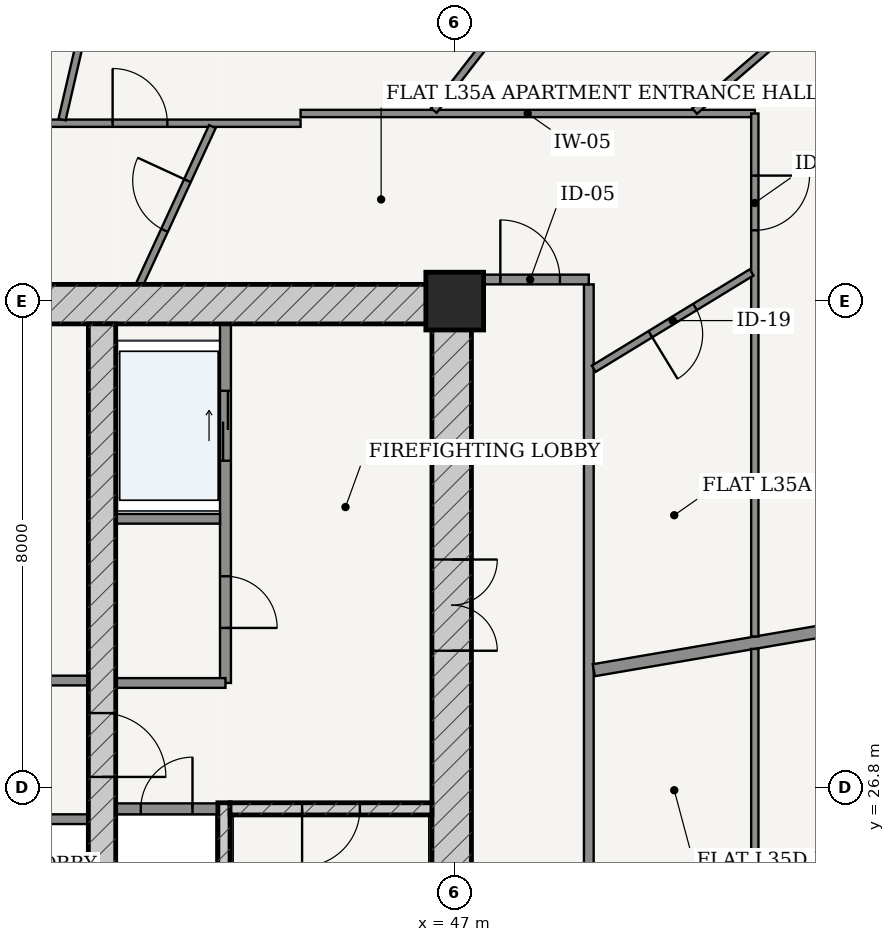
"""IFC4 building model, lengths in metres.
Left out: names, types, materials, properties, quantities, classifications, styles, units other than length and angle.
Written with IfcOpenShell. Run it as: python <this file> out.ifc"""

import sys

from ifc_helpers import new_model, si_unit, direction, frame, frame_2d, origin, origin_2d, place, context, subcontext, project, spatial, rectangle, extrude, source, transform, mapped, element, fill, save


model = new_model("IFC4")
c1 = context("Model", 3, precision=1e-05, world=origin(), true_north=direction((-0.2419218956, 0.970295726276)))
c2 = subcontext(c1, "Body", "Model", "MODEL_VIEW")
j1 = project(units=[si_unit("LENGTHUNIT", "METRE"), si_unit("PLANEANGLEUNIT", "RADIAN")], contexts=[c1])
p1 = place(None, origin())
s1 = spatial("IfcSite", under=j1, at=p1, CompositionType="ELEMENT")
p2 = place(p1, origin())
s2 = spatial("IfcBuilding", under=s1, at=p2, CompositionType="ELEMENT")
p3 = place(p2, frame((0.0, 0.0, 135.4)))
s3 = spatial("IfcBuildingStorey", under=s2, at=p3, CompositionType="ELEMENT", Elevation=135.4)
p4 = place(p3, frame((47.0, 34.8, 0.0), z_axis=(0.0, 0.0, 1.0), x_axis=(1.0, 0.0, 0.0)))
e1 = element("IfcColumn", 1, at=p4, inside=s3, PredefinedType="COLUMN", context=c2, shape_type="SweptSolid", body=[
    extrude(rectangle(XDim=0.95, YDim=0.95, at=origin_2d()), origin(), (0.0, 0.0, 1.0), 3.6),
])
p5 = place(p3, frame((28.725, 34.75, 0.0), z_axis=(0.0, 0.0, 1.0), x_axis=(1.0, 0.0, 0.0)))
e2 = element("IfcWall", 2, at=p5, inside=s3, PredefinedType="SHEAR", context=c2, shape_type="SweptSolid", body=[
    extrude(rectangle(XDim=18.55, YDim=0.65, at=frame_2d((9.275, 0.0))), origin(), (0.0, 0.0, 1.0), 3.33),
])
p6 = place(p3, frame((46.95, 19.175, 0.0), z_axis=(0.0, 0.0, 1.0), x_axis=(0.0, 1.0, 0.0)))
e3 = element("IfcWall", 3, at=p6, inside=s3, PredefinedType="SHEAR", context=c2, shape_type="SweptSolid", body=[
    extrude(rectangle(XDim=15.25, YDim=0.65, at=frame_2d((7.625, 0.0))), origin(), (0.0, 0.0, 1.0), 3.33),
])
p7 = place(p6, frame((9.875, 0.0, 0.0)))
e4 = element("IfcOpeningElement", 4, at=p7, cuts=e3, PredefinedType="OPENING", context=c2, shape_type="SweptSolid", body=[
    extrude(rectangle(XDim=1.5, YDim=2.2, at=frame_2d((0.75, 1.1))), frame((0.0, 0.335, 0.0), z_axis=(0.0, -1.0, 0.0), x_axis=(1.0, 0.0, 0.0)), (0.0, 0.0, 1.0), 0.67),
])
p8 = place(p3, frame((43.205, 19.175, 0.0), z_axis=(0.0, 0.0, 1.0), x_axis=(0.0, 1.0, 0.0)))
e5 = element("IfcWall", 5, at=p8, inside=s3, PredefinedType="SOLIDWALL", context=c2, shape_type="SweptSolid", body=[
    extrude(rectangle(XDim=7.375, YDim=0.2, at=frame_2d((3.688, 0.0))), origin(), (0.0, 0.0, 1.0), 3.33),
])
p9 = place(p3, frame((43.305, 26.45, 0.0), z_axis=(0.0, 0.0, 1.0), x_axis=(1.0, 0.0, 0.0)))
e6 = element("IfcWall", 6, at=p9, inside=s3, PredefinedType="SOLIDWALL", context=c2, shape_type="SweptSolid", body=[
    extrude(rectangle(XDim=3.32, YDim=0.2, at=frame_2d((1.66, 0.0))), origin(), (0.0, 0.0, 1.0), 3.33),
])
p10 = place(p9, frame((1.185, 0.0, 0.0)))
e7 = element("IfcOpeningElement", 7, at=p10, cuts=e6, PredefinedType="OPENING", context=c2, shape_type="SweptSolid", body=[
    extrude(rectangle(XDim=0.95, YDim=2.15, at=frame_2d((0.475, 1.075))), frame((0.0, 0.11, 0.0), z_axis=(0.0, -1.0, 0.0), x_axis=(1.0, 0.0, 0.0)), (0.0, 0.0, 1.0), 0.22),
])
p11 = place(p3, frame((41.2, 19.175, 0.0), z_axis=(0.0, 0.0, 1.0), x_axis=(0.0, 1.0, 0.0)))
e8 = element("IfcWall", 8, at=p11, inside=s3, PredefinedType="SHEAR", context=c2, shape_type="SweptSolid", body=[
    extrude(rectangle(XDim=15.25, YDim=0.45, at=frame_2d((7.625, 0.0))), origin(), (0.0, 0.0, 1.0), 3.33),
])
p12 = place(p11, frame((7.8, 0.0, 0.0)))
e9 = element("IfcOpeningElement", 9, at=p12, cuts=e8, PredefinedType="OPENING", context=c2, shape_type="SweptSolid", body=[
    extrude(rectangle(XDim=1.05, YDim=2.15, at=frame_2d((0.525, 1.075))), frame((0.0, 0.235, 0.0), z_axis=(0.0, -1.0, 0.0), x_axis=(1.0, 0.0, 0.0)), (0.0, 0.0, 1.0), 0.47),
])
p13 = place(p3, frame((41.425, 26.45, 0.0), z_axis=(0.0, 0.0, 1.0), x_axis=(1.0, 0.0, 0.0)))
e10 = element("IfcWall", 10, at=p13, inside=s3, PredefinedType="PARTITIONING", context=c2, shape_type="SweptSolid", body=[
    extrude(rectangle(XDim=1.675, YDim=0.18, at=frame_2d((0.837, 0.0))), origin(), (0.0, 0.0, 1.0), 3.33),
])
p14 = place(p13, frame((0.413, 0.0, 0.0)))
e11 = element("IfcOpeningElement", 11, at=p14, cuts=e10, PredefinedType="OPENING", context=c2, shape_type="SweptSolid", body=[
    extrude(rectangle(XDim=0.85, YDim=2.1, at=frame_2d((0.425, 1.05))), frame((0.0, 0.1, 0.0), z_axis=(0.0, -1.0, 0.0), x_axis=(1.0, 0.0, 0.0)), (0.0, 0.0, 1.0), 0.2),
])
p15 = place(p3, frame((43.23, 28.52, 0.0), z_axis=(0.0, 0.0, 1.0), x_axis=(0.0, 1.0, 0.0)))
e12 = element("IfcWall", 12, at=p15, inside=s3, PredefinedType="PARTITIONING", context=c2, shape_type="SweptSolid", body=[
    extrude(rectangle(XDim=5.905, YDim=0.18, at=frame_2d((2.953, 0.0))), origin(), (0.0, 0.0, 1.0), 3.33),
])
p16 = place(p15, frame((0.905, 0.0, 0.0)))
e13 = element("IfcOpeningElement", 13, at=p16, cuts=e12, PredefinedType="OPENING", context=c2, shape_type="SweptSolid", body=[
    extrude(rectangle(XDim=0.85, YDim=2.1, at=frame_2d((0.425, 1.05))), frame((0.0, 0.1, 0.0), z_axis=(0.0, -1.0, 0.0), x_axis=(1.0, 0.0, 0.0)), (0.0, 0.0, 1.0), 0.2),
])
p17 = place(p15, frame((3.655, 0.0, 0.0)))
e14 = element("IfcOpeningElement", 14, at=p17, cuts=e12, PredefinedType="OPENING", context=c2, shape_type="SweptSolid", body=[
    extrude(rectangle(XDim=1.15, YDim=2.2, at=frame_2d((0.575, 1.1))), frame((0.0, 0.1, 0.0), z_axis=(0.0, -1.0, 0.0), x_axis=(1.0, 0.0, 0.0)), (0.0, 0.0, 1.0), 0.2),
])
p18 = place(p3, frame((41.425, 31.22, 0.0), z_axis=(0.0, 0.0, 1.0), x_axis=(1.0, 0.0, 0.0)))
e15 = element("IfcWall", 15, at=p18, inside=s3, PredefinedType="PARTITIONING", context=c2, shape_type="SweptSolid", body=[
    extrude(rectangle(XDim=1.715, YDim=0.16, at=frame_2d((0.857, 0.0))), origin(), (0.0, 0.0, 1.0), 3.33),
])
p19 = place(p3, frame((41.425, 28.52, 0.0), z_axis=(0.0, 0.0, 1.0), x_axis=(1.0, 0.0, 0.0)))
e16 = element("IfcWall", 16, at=p19, inside=s3, PredefinedType="PARTITIONING", context=c2, shape_type="SweptSolid", body=[
    extrude(rectangle(XDim=1.805, YDim=0.16, at=frame_2d((0.902, 0.0))), origin(), (0.0, 0.0, 1.0), 3.33),
])
p20 = place(p3, frame((35.025, 28.56, 0.0), z_axis=(0.0, 0.0, 1.0), x_axis=(1.0, 0.0, 0.0)))
e17 = element("IfcWall", 17, at=p20, inside=s3, PredefinedType="PARTITIONING", context=c2, shape_type="SweptSolid", body=[
    extrude(rectangle(XDim=5.95, YDim=0.16, at=frame_2d((2.975, 0.0))), origin(), (0.0, 0.0, 1.0), 3.33),
])
p21 = place(p20, frame((1.008, 0.0, 0.0)))
e18 = element("IfcOpeningElement", 18, at=p21, cuts=e17, PredefinedType="OPENING", context=c2, shape_type="SweptSolid", body=[
    extrude(rectangle(XDim=0.86, YDim=2.1, at=frame_2d((0.43, 1.05))), frame((0.0, 0.09, 0.0), z_axis=(0.0, -1.0, 0.0), x_axis=(1.0, 0.0, 0.0)), (0.0, 0.0, 1.0), 0.18),
])
p22 = place(p20, frame((4.087, 0.0, 0.0)))
e19 = element("IfcOpeningElement", 19, at=p22, cuts=e17, PredefinedType="OPENING", context=c2, shape_type="SweptSolid", body=[
    extrude(rectangle(XDim=0.85, YDim=2.1, at=frame_2d((0.425, 1.05))), frame((0.0, 0.09, 0.0), z_axis=(0.0, -1.0, 0.0), x_axis=(1.0, 0.0, 0.0)), (0.0, 0.0, 1.0), 0.18),
])
p23 = place(p3, frame((35.025, 26.28, 0.0), z_axis=(0.0, 0.0, 1.0), x_axis=(1.0, 0.0, 0.0)))
e20 = element("IfcWall", 20, at=p23, inside=s3, PredefinedType="PARTITIONING", context=c2, shape_type="SweptSolid", body=[
    extrude(rectangle(XDim=5.95, YDim=0.16, at=frame_2d((2.975, 0.0))), origin(), (0.0, 0.0, 1.0), 3.33),
])
p24 = place(p23, frame((0.19, 0.0, 0.0)))
e21 = element("IfcOpeningElement", 21, at=p24, cuts=e20, PredefinedType="OPENING", context=c2, shape_type="SweptSolid", body=[
    extrude(rectangle(XDim=1.1, YDim=2.2, at=frame_2d((0.55, 1.1))), frame((0.0, 0.09, 0.0), z_axis=(0.0, -1.0, 0.0), x_axis=(1.0, 0.0, 0.0)), (0.0, 0.0, 1.0), 0.18),
])
p25 = place(p23, frame((1.67, 0.0, 0.0)))
e22 = element("IfcOpeningElement", 22, at=p25, cuts=e20, PredefinedType="OPENING", context=c2, shape_type="SweptSolid", body=[
    extrude(rectangle(XDim=1.1, YDim=2.2, at=frame_2d((0.55, 1.1))), frame((0.0, 0.09, 0.0), z_axis=(0.0, -1.0, 0.0), x_axis=(1.0, 0.0, 0.0)), (0.0, 0.0, 1.0), 0.18),
])
p26 = place(p3, frame((49.205, 16.675, 0.0), z_axis=(0.0, 0.0, 1.0), x_axis=(0.0, 1.0, 0.0)))
e23 = element("IfcWall", 23, at=p26, inside=s3, PredefinedType="PARTITIONING", context=c2, shape_type="SweptSolid", body=[
    extrude(rectangle(XDim=18.4, YDim=0.16, at=frame_2d((9.2, 0.0))), origin(), (0.0, 0.0, 1.0), 2.776),
])
p27 = place(p3, frame((47.275, 35.155, 0.0), z_axis=(0.0, 0.0, 1.0), x_axis=(1.0, 0.0, 0.0)))
e24 = element("IfcWall", 24, at=p27, inside=s3, PredefinedType="PARTITIONING", context=c2, shape_type="SweptSolid", body=[
    extrude(rectangle(XDim=1.93, YDim=0.16, at=frame_2d((0.965, 0.0))), origin(), (0.0, 0.0, 1.0), 2.776),
])
p28 = place(p27, frame((0.475, 0.0, 0.0)))
e25 = element("IfcOpeningElement", 25, at=p28, cuts=e24, PredefinedType="OPENING", context=c2, shape_type="SweptSolid", body=[
    extrude(rectangle(XDim=0.98, YDim=2.2, at=frame_2d((0.49, 1.1))), frame((0.0, 0.09, 0.0), z_axis=(0.0, -1.0, 0.0), x_axis=(1.0, 0.0, 0.0)), (0.0, 0.0, 1.0), 0.18),
])
p29 = place(p3, frame((49.287, 28.73, 0.0), z_axis=(0.0, 0.0, 1.0), x_axis=(0.985698993845, 0.168515558725, 0.0)))
e26 = element("IfcWall", 26, at=p29, inside=s3, PredefinedType="PARTITIONING", context=c2, shape_type="SweptSolid", body=[
    extrude(rectangle(XDim=12.517, YDim=0.2, at=frame_2d((6.259, 0.0))), origin(), (0.0, 0.0, 1.0), 2.776),
])
p30 = place(p3, frame((38.102, 37.725, 0.0), z_axis=(0.0, 0.0, 1.0), x_axis=(1.0, 0.0, 0.0)))
e27 = element("IfcWall", 27, at=p30, inside=s3, PredefinedType="PARTITIONING", context=c2, shape_type="SweptSolid", body=[
    extrude(rectangle(XDim=6.363, YDim=0.12, at=frame_2d((3.182, 0.0))), origin(), (0.0, 0.0, 1.0), 2.776),
])
p31 = place(p30, frame((3.272, 0.0, 0.0)))
e28 = element("IfcOpeningElement", 28, at=p31, cuts=e27, PredefinedType="OPENING", context=c2, shape_type="SweptSolid", body=[
    extrude(rectangle(XDim=0.9, YDim=2.15, at=frame_2d((0.45, 1.075))), frame((0.0, 0.07, 0.0), z_axis=(0.0, -1.0, 0.0), x_axis=(1.0, 0.0, 0.0)), (0.0, 0.0, 1.0), 0.14),
])
p32 = place(p3, frame((44.465, 37.885, 0.0), z_axis=(0.0, 0.0, 1.0), x_axis=(1.0, 0.0, 0.0)))
e29 = element("IfcWall", 29, at=p32, inside=s3, PredefinedType="PARTITIONING", context=c2, shape_type="SweptSolid", body=[
    extrude(rectangle(XDim=7.47, YDim=0.12, at=frame_2d((3.735, 0.0))), origin(), (0.0, 0.0, 1.0), 2.776),
])
p33 = place(p3, frame((51.935, 37.885, 0.0), z_axis=(0.0, 0.0, 1.0), x_axis=(0.0, -1.0, 0.0)))
e30 = element("IfcWall", 30, at=p33, inside=s3, PredefinedType="PARTITIONING", context=c2, shape_type="SweptSolid", body=[
    extrude(rectangle(XDim=8.601, YDim=0.12, at=frame_2d((4.3, 0.0))), origin(), (0.0, 0.0, 1.0), 2.776),
])
p34 = place(p33, frame((1.021, 0.0, 0.0)))
e31 = element("IfcOpeningElement", 31, at=p34, cuts=e30, PredefinedType="OPENING", context=c2, shape_type="SweptSolid", body=[
    extrude(rectangle(XDim=0.9, YDim=2.15, at=frame_2d((0.45, 1.075))), frame((0.0, 0.07, 0.0), z_axis=(0.0, -1.0, 0.0), x_axis=(1.0, 0.0, 0.0)), (0.0, 0.0, 1.0), 0.14),
])
p35 = place(p3, frame((50.944, 37.925, 0.0), z_axis=(0.0, 0.0, 1.0), x_axis=(0.758354915574, 0.65184186888, 0.0)))
e32 = element("IfcWall", 32, at=p35, inside=s3, PredefinedType="PARTITIONING", context=c2, shape_type="SweptSolid", body=[
    extrude(rectangle(XDim=5.432, YDim=0.12, at=frame_2d((2.716, 0.0))), origin(), (0.0, 0.0, 1.0), 2.846),
])
p36 = place(p3, frame((46.656, 37.934, 0.0), z_axis=(0.0, 0.0, 1.0), x_axis=(0.613758289074, 0.789493991487, 0.0)))
e33 = element("IfcWall", 33, at=p36, inside=s3, PredefinedType="PARTITIONING", context=c2, shape_type="SweptSolid", body=[
    extrude(rectangle(XDim=7.695, YDim=0.12, at=frame_2d((3.848, 0.0))), origin(), (0.0, 0.0, 1.0), 2.776),
])
p37 = place(p36, frame((2.395, 0.0, 0.0)))
e34 = element("IfcOpeningElement", 34, at=p37, cuts=e33, PredefinedType="OPENING", context=c2, shape_type="SweptSolid", body=[
    extrude(rectangle(XDim=0.9, YDim=2.15, at=frame_2d((0.45, 1.075))), frame((0.0, 0.07, 0.0), z_axis=(0.0, -1.0, 0.0), x_axis=(1.0, 0.0, 0.0)), (0.0, 0.0, 1.0), 0.14),
])
p38 = place(p3, frame((40.542, 37.785, 0.0), z_axis=(0.0, 0.0, 1.0), x_axis=(0.225467545633, 0.974250679171, 0.0)))
e35 = element("IfcWall", 35, at=p38, inside=s3, PredefinedType="PARTITIONING", context=c2, shape_type="SweptSolid", body=[
    extrude(rectangle(XDim=9.559, YDim=0.12, at=frame_2d((4.78, 0.0))), origin(), (0.0, 0.0, 1.0), 2.776),
])
p39 = place(p38, frame((3.32, 0.0, 0.0)))
e36 = element("IfcOpeningElement", 36, at=p39, cuts=e35, PredefinedType="OPENING", context=c2, shape_type="SweptSolid", body=[
    extrude(rectangle(XDim=0.9, YDim=2.15, at=frame_2d((0.45, 1.075))), frame((0.0, 0.07, 0.0), z_axis=(0.0, -1.0, 0.0), x_axis=(1.0, 0.0, 0.0)), (0.0, 0.0, 1.0), 0.14),
])
p40 = place(p3, frame((49.287, 33.688, 0.0), z_axis=(0.0, 0.0, 1.0), x_axis=(0.853628993111, 0.520881504874, 0.0)))
e37 = element("IfcWall", 37, at=p40, inside=s3, PredefinedType="PARTITIONING", context=c2, shape_type="SweptSolid", body=[
    extrude(rectangle(XDim=3.041, YDim=0.12, at=frame_2d((1.52, 0.0))), origin(), (0.0, 0.0, 1.0), 3.005),
])
p41 = place(p40, frame((1.09, 0.0, 0.0)))
e38 = element("IfcOpeningElement", 38, at=p41, cuts=e37, PredefinedType="OPENING", context=c2, shape_type="SweptSolid", body=[
    extrude(rectangle(XDim=0.86, YDim=2.15, at=frame_2d((0.43, 1.075))), frame((0.0, 0.07, 0.0), z_axis=(0.0, -1.0, 0.0), x_axis=(1.0, 0.0, 0.0)), (0.0, 0.0, 1.0), 0.14),
])
p42 = place(p3, frame((41.817, 35.075, 0.0), z_axis=(0.0, 0.0, 1.0), x_axis=(0.418890148101, 0.908036917655, 0.0)))
e39 = element("IfcWall", 39, at=p42, inside=s3, PredefinedType="PARTITIONING", context=c2, shape_type="SweptSolid", body=[
    extrude(rectangle(XDim=2.856, YDim=0.12, at=frame_2d((1.428, 0.0))), origin(), (0.0, 0.0, 1.0), 3.33),
])
p43 = place(p42, frame((0.978, 0.0, 0.0)))
e40 = element("IfcOpeningElement", 40, at=p43, cuts=e39, PredefinedType="OPENING", context=c2, shape_type="SweptSolid", body=[
    extrude(rectangle(XDim=0.9, YDim=2.15, at=frame_2d((0.45, 1.075))), frame((0.0, 0.07, 0.0), z_axis=(0.0, -1.0, 0.0), x_axis=(1.0, 0.0, 0.0)), (0.0, 0.0, 1.0), 0.14),
])
p44 = place(p3, frame((51.935, 29.08, 0.0), z_axis=(0.0, 0.0, 1.0), x_axis=(0.0, -1.0, 0.0)))
e41 = element("IfcWall", 41, at=p44, inside=s3, PredefinedType="PARTITIONING", context=c2, shape_type="SweptSolid", body=[
    extrude(rectangle(XDim=15.215, YDim=0.12, at=frame_2d((7.608, 0.0))), origin(), (0.0, 0.0, 1.0), 2.776),
])
p45 = place(p44, frame((11.859, 0.0, 0.0)))
e42 = element("IfcOpeningElement", 42, at=p45, cuts=e41, PredefinedType="OPENING", context=c2, shape_type="SweptSolid", body=[
    extrude(rectangle(XDim=0.9, YDim=2.15, at=frame_2d((0.45, 1.075))), frame((0.0, 0.07, 0.0), z_axis=(0.0, -1.0, 0.0), x_axis=(1.0, 0.0, 0.0)), (0.0, 0.0, 1.0), 0.14),
])
p46 = place(p44, frame((7.49, 0.0, 0.0)))
e43 = element("IfcOpeningElement", 43, at=p46, cuts=e41, PredefinedType="OPENING", context=c2, shape_type="SweptSolid", body=[
    extrude(rectangle(XDim=0.9, YDim=2.15, at=frame_2d((0.45, 1.075))), frame((0.0, 0.07, 0.0), z_axis=(0.0, -1.0, 0.0), x_axis=(1.0, 0.0, 0.0)), (0.0, 0.0, 1.0), 0.14),
])
m1 = source(origin(), c2, "Body", "SweptSolid", [
    extrude(rectangle(XDim=1.5, YDim=2.2, at=frame_2d((0.75, 1.1))), frame((0.0, 0.025, 0.0), z_axis=(0.0, -1.0, 0.0), x_axis=(1.0, 0.0, 0.0)), (0.0, 0.0, 1.0), 0.05),
])
p47 = place(p7, frame((1.5, 0.0, 0.0), z_axis=(0.0, 0.0, 1.0), x_axis=(-1.0, 0.0, 0.0)))
e44 = element("IfcDoor", 44, at=p47, inside=s3, OperationType="DOUBLE_DOOR_SINGLE_SWING", PredefinedType="DOOR", context=c2, shape_type="MappedRepresentation", body=[
    mapped(m1, transform((0.0, 0.0, 0.0), scale=1.0)),
])
fill(e4, e44)
m2 = source(origin(), c2, "Body", "SweptSolid", [
    extrude(rectangle(XDim=1.05, YDim=2.15, at=frame_2d((0.525, 1.075))), frame((0.0, 0.025, 0.0), z_axis=(0.0, -1.0, 0.0), x_axis=(1.0, 0.0, 0.0)), (0.0, 0.0, 1.0), 0.05),
])
p48 = place(p12, frame((1.05, 0.0, 0.0), z_axis=(0.0, 0.0, 1.0), x_axis=(-1.0, 0.0, 0.0)))
e45 = element("IfcDoor", 45, at=p48, inside=s3, OperationType="SINGLE_SWING_RIGHT", PredefinedType="DOOR", context=c2, shape_type="MappedRepresentation", body=[
    mapped(m2, transform((0.0, 0.0, 0.0), scale=1.0)),
])
fill(e9, e45)
m3 = source(origin(), c2, "Body", "SweptSolid", [
    extrude(rectangle(XDim=0.95, YDim=2.15, at=frame_2d((0.475, 1.075))), frame((0.0, 0.025, 0.0), z_axis=(0.0, -1.0, 0.0), x_axis=(1.0, 0.0, 0.0)), (0.0, 0.0, 1.0), 0.05),
])
p49 = place(p10, frame((0.95, 0.0, 0.0), z_axis=(0.0, 0.0, 1.0), x_axis=(-1.0, 0.0, 0.0)))
e46 = element("IfcDoor", 46, at=p49, inside=s3, OperationType="SINGLE_SWING_RIGHT", PredefinedType="DOOR", context=c2, shape_type="MappedRepresentation", body=[
    mapped(m3, transform((0.0, 0.0, 0.0), scale=1.0)),
])
fill(e7, e46)
m4 = source(origin(), c2, "Body", "SweptSolid", [
    extrude(rectangle(XDim=0.85, YDim=2.1, at=frame_2d((0.425, 1.05))), frame((0.0, 0.025, 0.0), z_axis=(0.0, -1.0, 0.0), x_axis=(1.0, 0.0, 0.0)), (0.0, 0.0, 1.0), 0.05),
])
p50 = place(p14, origin())
e47 = element("IfcDoor", 47, at=p50, inside=s3, OperationType="SINGLE_SWING_RIGHT", PredefinedType="DOOR", context=c2, shape_type="MappedRepresentation", body=[
    mapped(m4, transform((0.0, 0.0, 0.0), scale=1.0)),
])
fill(e11, e47)
p51 = place(p16, frame((0.85, 0.0, 0.0), z_axis=(0.0, 0.0, 1.0), x_axis=(-1.0, 0.0, 0.0)))
e48 = element("IfcDoor", 48, at=p51, inside=s3, OperationType="SINGLE_SWING_RIGHT", PredefinedType="DOOR", context=c2, shape_type="MappedRepresentation", body=[
    mapped(m4, transform((0.0, 0.0, 0.0), scale=1.0)),
])
fill(e13, e48)
m5 = source(origin(), c2, "Body", "SweptSolid", [
    extrude(rectangle(XDim=1.15, YDim=2.2, at=frame_2d((0.575, 1.1))), frame((0.0, 0.025, 0.0), z_axis=(0.0, -1.0, 0.0), x_axis=(1.0, 0.0, 0.0)), (0.0, 0.0, 1.0), 0.05),
])
p52 = place(p17, origin())
e49 = element("IfcDoor", 49, at=p52, inside=s3, OperationType="DOUBLE_DOOR_SLIDING", PredefinedType="DOOR", context=c2, shape_type="MappedRepresentation", body=[
    mapped(m5, transform((0.0, 0.0, 0.0), scale=1.0)),
])
fill(e14, e49)
m6 = source(origin(), c2, "Body", "SweptSolid", [
    extrude(rectangle(XDim=0.98, YDim=2.2, at=frame_2d((0.49, 1.1))), frame((0.0, 0.025, 0.0), z_axis=(0.0, -1.0, 0.0), x_axis=(1.0, 0.0, 0.0)), (0.0, 0.0, 1.0), 0.05),
])
p53 = place(p28, origin())
e50 = element("IfcDoor", 50, at=p53, inside=s3, OperationType="SINGLE_SWING_LEFT", PredefinedType="DOOR", context=c2, shape_type="MappedRepresentation", body=[
    mapped(m6, transform((0.0, 0.0, 0.0), scale=1.0)),
])
fill(e25, e50)
m7 = source(origin(), c2, "Body", "SweptSolid", [
    extrude(rectangle(XDim=0.86, YDim=2.15, at=frame_2d((0.43, 1.075))), frame((0.0, 0.025, 0.0), z_axis=(0.0, -1.0, 0.0), x_axis=(1.0, 0.0, 0.0)), (0.0, 0.0, 1.0), 0.05),
])
p54 = place(p41, frame((0.86, 0.0, 0.0), z_axis=(0.0, 0.0, 1.0), x_axis=(-1.0, 0.0, 0.0)))
e51 = element("IfcDoor", 51, at=p54, inside=s3, OperationType="SINGLE_SWING_RIGHT", PredefinedType="DOOR", context=c2, shape_type="MappedRepresentation", body=[
    mapped(m7, transform((0.0, 0.0, 0.0), scale=1.0)),
])
fill(e38, e51)
m8 = source(origin(), c2, "Body", "SweptSolid", [
    extrude(rectangle(XDim=0.9, YDim=2.15, at=frame_2d((0.45, 1.075))), frame((0.0, 0.025, 0.0), z_axis=(0.0, -1.0, 0.0), x_axis=(1.0, 0.0, 0.0)), (0.0, 0.0, 1.0), 0.05),
])
p55 = place(p34, origin())
e52 = element("IfcDoor", 52, at=p55, inside=s3, OperationType="SINGLE_SWING_LEFT", PredefinedType="DOOR", context=c2, shape_type="MappedRepresentation", body=[
    mapped(m8, transform((0.0, 0.0, 0.0), scale=1.0)),
])
fill(e31, e52)
p56 = place(p43, origin())
e53 = element("IfcDoor", 53, at=p56, inside=s3, OperationType="SINGLE_SWING_RIGHT", PredefinedType="DOOR", context=c2, shape_type="MappedRepresentation", body=[
    mapped(m8, transform((0.0, 0.0, 0.0), scale=1.0)),
])
fill(e40, e53)
p57 = place(p31, origin())
e54 = element("IfcDoor", 54, at=p57, inside=s3, OperationType="SINGLE_SWING_LEFT", PredefinedType="DOOR", context=c2, shape_type="MappedRepresentation", body=[
    mapped(m8, transform((0.0, 0.0, 0.0), scale=1.0)),
])
fill(e28, e54)
save(model, sys.argv[1])
